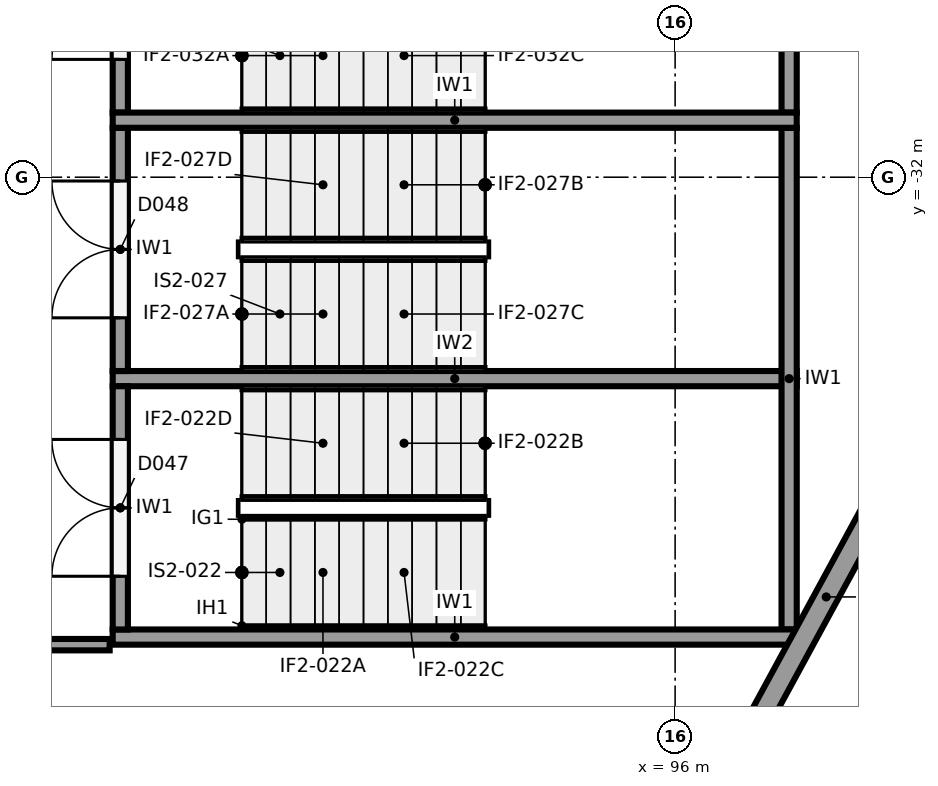
"""IFC4 building model, lengths in metres.
Left out: names, types, materials, properties, quantities, classifications, styles, units other than length and angle.
Written with IfcOpenShell. Run it as: python <this file> out.ifc"""

import sys

from ifc_helpers import new_model, si_unit, direction, frame, frame_2d, origin, place, context, subcontext, project, spatial, rectangle, extrude, element, fill, save


model = new_model("IFC4")
c1 = context("Model", 3, precision=1e-05, world=origin(), true_north=direction((0.0, 1.0)))
c2 = subcontext(c1, "Body", "Model", "MODEL_VIEW")
j1 = project(units=[si_unit("LENGTHUNIT", "METRE"), si_unit("PLANEANGLEUNIT", "RADIAN")], contexts=[c1])
p1 = place(None, origin())
s1 = spatial("IfcSite", under=j1, at=p1, CompositionType="ELEMENT")
p2 = place(p1, origin())
s2 = spatial("IfcBuilding", under=s1, at=p2, CompositionType="ELEMENT")
p3 = place(p2, origin())
s3 = spatial("IfcBuildingStorey", under=s2, at=p3, CompositionType="ELEMENT", Elevation=0.0)
p4 = place(p3, frame((101.161, -31.689, 0.0), z_axis=(0.0, 0.0, 1.0), x_axis=(-0.477867771117, -0.878431780691, 0.0)))
e1 = element("IfcWall", 1, at=p4, inside=s3, PredefinedType="SOLIDWALL", context=c2, shape_type="SweptSolid", body=[
    extrude(rectangle(XDim=13.28, YDim=0.3, at=frame_2d((6.64, 0.0))), origin(), (0.0, 0.0, 1.0), 4.85),
])
p5 = place(p3, frame((94.815, -19.145, 0.0), z_axis=(0.0, 0.0, 1.0), x_axis=(0.477867771117, -0.878431780691, 0.0)))
e2 = element("IfcWall", 2, at=p5, inside=s3, PredefinedType="SOLIDWALL", context=c2, shape_type="SweptSolid", body=[
    extrude(rectangle(XDim=13.28, YDim=0.3, at=frame_2d((6.64, 0.0))), origin(), (0.0, 0.0, 1.0), 4.85),
])
p6 = place(p5, frame((2.45, 0.0, 0.0)))
e3 = element("IfcOpeningElement", 3, at=p6, cuts=e2, PredefinedType="OPENING", context=c2, shape_type="SweptSolid", body=[
    extrude(rectangle(XDim=1.0, YDim=2.1, at=frame_2d((0.5, 1.05))), frame((0.0, 0.16, 0.0), z_axis=(0.0, -1.0, 0.0), x_axis=(1.0, 0.0, 0.0)), (0.0, 0.0, 1.0), 0.32),
])
for number, where, z_axis, x_axis in (
    (4, (97.6, -38.05, 0.0), (0.0, 0.0, 1.0), (-1.0, 0.0, 0.0)),
    (5, (97.6, -31.25, 0.0), (0.0, 0.0, 1.0), (-1.0, 0.0, 0.0)),
):
    element("IfcWall", number, at=place(p3, frame(where, z_axis=z_axis, x_axis=x_axis)), inside=s3, PredefinedType="SHEAR", context=c2, shape_type="SweptSolid", body=[
        extrude(rectangle(XDim=9.0, YDim=0.2, at=frame_2d((4.5, 0.0))), origin(), (0.0, 0.0, 1.0), 6.15),
    ])
for number, where, z_axis, x_axis in (
    (6, (97.5, -37.95, 0.0), (0.0, 0.0, 1.0), (0.0, 1.0, 0.0)),
    (7, (97.5, -31.15, 0.0), (0.0, 0.0, 1.0), (0.0, 1.0, 0.0)),
):
    element("IfcWall", number, at=place(p3, frame(where, z_axis=z_axis, x_axis=x_axis)), inside=s3, PredefinedType="SHEAR", context=c2, shape_type="SweptSolid", body=[
        extrude(rectangle(XDim=6.6, YDim=0.2, at=frame_2d((3.3, 0.0))), origin(), (0.0, 0.0, 1.0), 6.15),
    ])
p7 = place(p3, frame((97.6, -34.65, 0.0), z_axis=(0.0, 0.0, 1.0), x_axis=(-1.0, 0.0, 0.0)))
e8 = element("IfcWall", 8, at=p7, inside=s3, PredefinedType="SHEAR", context=c2, shape_type="SweptSolid", body=[
    extrude(rectangle(XDim=9.0, YDim=0.2, at=frame_2d((4.5, 0.0))), origin(), (0.0, 0.0, 1.0), 6.15),
])
p8 = place(p3, frame((88.7, -37.95, 0.0), z_axis=(0.0, 0.0, 1.0), x_axis=(0.0, 1.0, 0.0)))
e9 = element("IfcWall", 9, at=p8, inside=s3, PredefinedType="SHEAR", context=c2, shape_type="SweptSolid", body=[
    extrude(rectangle(XDim=3.2, YDim=0.2, at=frame_2d((1.6, 0.0))), origin(), (0.0, 0.0, 1.0), 6.15),
])
p9 = place(p8, frame((0.7, 0.0, 0.0)))
e10 = element("IfcOpeningElement", 10, at=p9, cuts=e9, PredefinedType="OPENING", context=c2, shape_type="SweptSolid", body=[
    extrude(rectangle(XDim=1.8, YDim=2.1, at=frame_2d((0.9, 1.05))), frame((0.0, 0.11, 0.0), z_axis=(0.0, -1.0, 0.0), x_axis=(1.0, 0.0, 0.0)), (0.0, 0.0, 1.0), 0.22),
])
p10 = place(p3, frame((88.7, -34.55, 0.0), z_axis=(0.0, 0.0, 1.0), x_axis=(0.0, 1.0, 0.0)))
e11 = element("IfcWall", 11, at=p10, inside=s3, PredefinedType="SHEAR", context=c2, shape_type="SweptSolid", body=[
    extrude(rectangle(XDim=3.2, YDim=0.2, at=frame_2d((1.6, 0.0))), origin(), (0.0, 0.0, 1.0), 6.15),
])
p11 = place(p10, frame((0.7, 0.0, 0.0)))
e12 = element("IfcOpeningElement", 12, at=p11, cuts=e11, PredefinedType="OPENING", context=c2, shape_type="SweptSolid", body=[
    extrude(rectangle(XDim=1.8, YDim=2.1, at=frame_2d((0.9, 1.05))), frame((0.0, 0.11, 0.0), z_axis=(0.0, -1.0, 0.0), x_axis=(1.0, 0.0, 0.0)), (0.0, 0.0, 1.0), 0.22),
])
p12 = place(p3, frame((88.7, -31.15, 0.0), z_axis=(0.0, 0.0, 1.0), x_axis=(0.0, 1.0, 0.0)))
e13 = element("IfcWall", 13, at=p12, inside=s3, PredefinedType="SHEAR", context=c2, shape_type="SweptSolid", body=[
    extrude(rectangle(XDim=3.2, YDim=0.2, at=frame_2d((1.6, 0.0))), origin(), (0.0, 0.0, 1.0), 6.15),
])
p13 = place(p12, frame((0.7, 0.0, 0.0)))
e14 = element("IfcOpeningElement", 14, at=p13, cuts=e13, PredefinedType="OPENING", context=c2, shape_type="SweptSolid", body=[
    extrude(rectangle(XDim=1.8, YDim=2.1, at=frame_2d((0.9, 1.05))), frame((0.0, 0.11, 0.0), z_axis=(0.0, -1.0, 0.0), x_axis=(1.0, 0.0, 0.0)), (0.0, 0.0, 1.0), 0.22),
])
p14 = place(p3, frame((85.577, -38.15, 0.0), z_axis=(0.0, 0.0, 1.0), x_axis=(1.0, 0.0, 0.0)))
e15 = element("IfcWall", 15, at=p14, inside=s3, PredefinedType="PARTITIONING", context=c2, shape_type="SweptSolid", body=[
    extrude(rectangle(XDim=2.983, YDim=0.15, at=frame_2d((1.491, 0.0))), origin(), (0.0, 0.0, 1.0), 6.15),
])
p15 = place(p3, frame((98.459, -43.352, 0.0), z_axis=(0.0, 0.0, 1.0), x_axis=(0.477866525751, 0.87843245817, 0.0)))
e16 = element("IfcWall", 16, at=p15, inside=s3, PredefinedType="PARTITIONING", context=c2, shape_type="SweptSolid", body=[
    extrude(rectangle(XDim=13.35, YDim=0.15, at=frame_2d((6.675, 0.0))), origin(), (0.0, 0.0, 1.0), 4.85),
])
p16 = place(p9, origin())
e17 = element("IfcDoor", 17, at=p16, inside=s3, OperationType="DOUBLE_DOOR_SINGLE_SWING", PredefinedType="DOOR", context=c2, shape_type="SweptSolid", body=[
    extrude(rectangle(XDim=1.8, YDim=2.1, at=frame_2d((0.9, 1.05))), frame((0.0, 0.025, 0.0), z_axis=(0.0, -1.0, 0.0), x_axis=(1.0, 0.0, 0.0)), (0.0, 0.0, 1.0), 0.05),
])
fill(e10, e17)
p17 = place(p11, origin())
e18 = element("IfcDoor", 18, at=p17, inside=s3, OperationType="DOUBLE_DOOR_SINGLE_SWING", PredefinedType="DOOR", context=c2, shape_type="SweptSolid", body=[
    extrude(rectangle(XDim=1.8, YDim=2.1, at=frame_2d((0.9, 1.05))), frame((0.0, 0.025, 0.0), z_axis=(0.0, -1.0, 0.0), x_axis=(1.0, 0.0, 0.0)), (0.0, 0.0, 1.0), 0.05),
])
fill(e12, e18)
p18 = place(p13, origin())
e19 = element("IfcDoor", 19, at=p18, inside=s3, OperationType="DOUBLE_DOOR_SINGLE_SWING", PredefinedType="DOOR", context=c2, shape_type="SweptSolid", body=[
    extrude(rectangle(XDim=1.8, YDim=2.1, at=frame_2d((0.9, 1.05))), frame((0.0, 0.025, 0.0), z_axis=(0.0, -1.0, 0.0), x_axis=(1.0, 0.0, 0.0)), (0.0, 0.0, 1.0), 0.05),
])
fill(e14, e19)
save(model, sys.argv[1])
